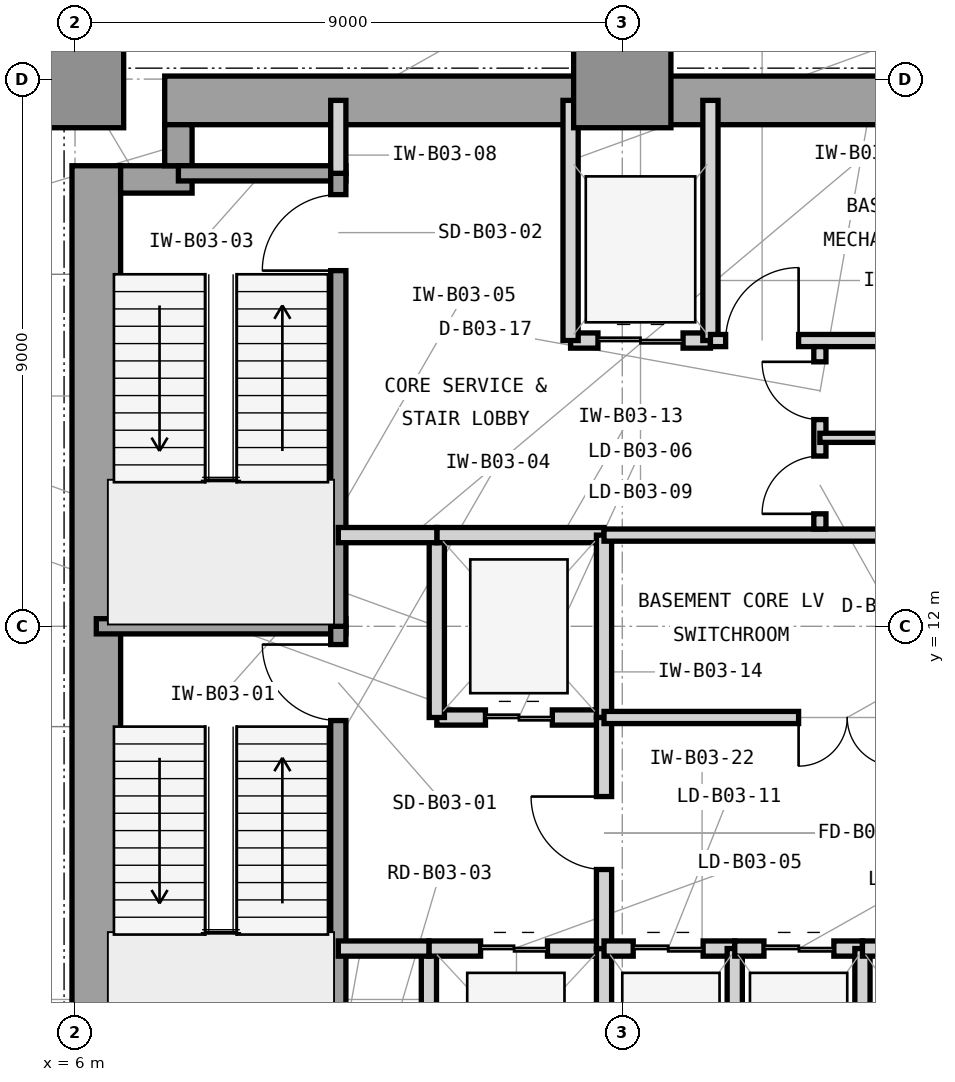
"""IFC4 building model, lengths in metres.
Left out: names, types, materials, properties, quantities, classifications, styles, units other than length and angle.
Written with IfcOpenShell. Run it as: python <this file> out.ifc"""

import sys

from ifc_helpers import new_model, si_unit, direction, frame, frame_2d, origin, origin_2d, place, context, subcontext, project, spatial, rectangle, extrude, element, fill, save


model = new_model("IFC4")
c1 = context("Model", 3, precision=1e-05, world=origin(), true_north=direction((0.0, 1.0)))
c2 = subcontext(c1, "Body", "Model", "MODEL_VIEW")
j1 = project(units=[si_unit("LENGTHUNIT", "METRE"), si_unit("PLANEANGLEUNIT", "RADIAN")], contexts=[c1])
p1 = place(None, origin())
s1 = spatial("IfcSite", under=j1, at=p1, CompositionType="ELEMENT")
p2 = place(p1, origin())
s2 = spatial("IfcBuilding", under=s1, at=p2, CompositionType="ELEMENT")
p3 = place(p2, frame((0.0, 0.0, -13.5)))
s3 = spatial("IfcBuildingStorey", under=s2, at=p3, CompositionType="ELEMENT", Elevation=-13.5)
p4 = place(p3, frame((6.35, 4.425, 0.0), z_axis=(0.0, 0.0, 1.0), x_axis=(0.0, 1.0, 0.0)))
e1 = element("IfcWall", 1, at=p4, inside=s3, PredefinedType="SHEAR", context=c2, shape_type="SweptSolid", body=[
    extrude(rectangle(XDim=15.15, YDim=0.8, at=frame_2d((7.575, 0.0))), origin(), (0.0, 0.0, 1.0), 4.5),
])
p5 = place(p3, frame((7.475, 20.65, 0.0), z_axis=(0.0, 0.0, 1.0), x_axis=(1.0, 0.0, 0.0)))
e2 = element("IfcWall", 2, at=p5, inside=s3, PredefinedType="SHEAR", context=c2, shape_type="SweptSolid", body=[
    extrude(rectangle(XDim=12.325, YDim=0.8, at=frame_2d((6.163, 0.0))), origin(), (0.0, 0.0, 1.0), 4.5),
])
p6 = place(p3, frame((6.75, 19.35, 0.0), z_axis=(0.0, 0.0, 1.0), x_axis=(1.0, 0.0, 0.0)))
e3 = element("IfcWall", 3, at=p6, inside=s3, PredefinedType="SHEAR", context=c2, shape_type="SweptSolid", body=[
    extrude(rectangle(XDim=1.175, YDim=0.45, at=frame_2d((0.587, 0.0))), origin(), (0.0, 0.0, 1.0), 4.5),
])
p7 = place(p3, frame((7.7, 19.575, 0.0), z_axis=(0.0, 0.0, 1.0), x_axis=(0.0, 1.0, 0.0)))
e4 = element("IfcWall", 4, at=p7, inside=s3, PredefinedType="SHEAR", context=c2, shape_type="SweptSolid", body=[
    extrude(rectangle(XDim=0.675, YDim=0.45, at=frame_2d((0.337, 0.0))), origin(), (0.0, 0.0, 1.0), 4.5),
])
for number, where, z_axis, x_axis in (
    (5, (6.0, 21.0, 0.0), (0.0, 0.0, 1.0), (1.0, 0.0, 0.0)),
    (6, (15.0, 21.0, 0.0), (0.0, 0.0, 1.0), (1.0, 0.0, 0.0)),
):
    element("IfcColumn", number, at=place(p3, frame(where, z_axis=z_axis, x_axis=x_axis)), inside=s3, PredefinedType="COLUMN", context=c2, shape_type="SweptSolid", body=[
        extrude(rectangle(XDim=1.6, YDim=1.6, at=origin_2d()), origin(), (0.0, 0.0, 1.0), 4.5),
    ])
p8 = place(p3, frame((6.35, 12.0, 0.0), z_axis=(0.0, 0.0, 1.0), x_axis=(1.0, 0.0, 0.0)))
e7 = element("IfcWall", 7, at=p8, inside=s3, PredefinedType="SHEAR", context=c2, shape_type="SweptSolid", body=[
    extrude(rectangle(XDim=4.105, YDim=0.25, at=frame_2d((2.052, 0.0))), origin(), (0.0, 0.0, 1.0), 4.5),
])
p9 = place(p3, frame((7.7, 19.45, 0.0), z_axis=(0.0, 0.0, 1.0), x_axis=(1.0, 0.0, 0.0)))
e8 = element("IfcWall", 8, at=p9, inside=s3, PredefinedType="SHEAR", context=c2, shape_type="SweptSolid", body=[
    extrude(rectangle(XDim=2.755, YDim=0.25, at=frame_2d((1.377, 0.0))), origin(), (0.0, 0.0, 1.0), 4.5),
])
p10 = place(p3, frame((10.33, 4.55, 0.0), z_axis=(0.0, 0.0, 1.0), x_axis=(0.0, 1.0, 0.0)))
e9 = element("IfcWall", 9, at=p10, inside=s3, PredefinedType="SHEAR", context=c2, shape_type="SweptSolid", body=[
    extrude(rectangle(XDim=7.45, YDim=0.25, at=frame_2d((3.725, 0.0))), origin(), (0.0, 0.0, 1.0), 4.5),
])
p11 = place(p10, frame((5.9, 0.0, 0.0)))
e10 = element("IfcOpeningElement", 10, at=p11, cuts=e9, PredefinedType="OPENING", context=c2, shape_type="SweptSolid", body=[
    extrude(rectangle(XDim=1.25, YDim=2.2, at=frame_2d((0.625, 1.1))), frame((0.0, 0.135, 0.0), z_axis=(0.0, -1.0, 0.0), x_axis=(1.0, 0.0, 0.0)), (0.0, 0.0, 1.0), 0.27),
])
p12 = place(p3, frame((10.33, 12.0, 0.0), z_axis=(0.0, 0.0, 1.0), x_axis=(0.0, 1.0, 0.0)))
e11 = element("IfcWall", 11, at=p12, inside=s3, PredefinedType="SHEAR", context=c2, shape_type="SweptSolid", body=[
    extrude(rectangle(XDim=7.45, YDim=0.25, at=frame_2d((3.725, 0.0))), origin(), (0.0, 0.0, 1.0), 4.5),
])
p13 = place(p12, frame((5.85, 0.0, 0.0)))
e12 = element("IfcOpeningElement", 12, at=p13, cuts=e11, PredefinedType="OPENING", context=c2, shape_type="SweptSolid", body=[
    extrude(rectangle(XDim=1.25, YDim=2.2, at=frame_2d((0.625, 1.1))), frame((0.0, 0.135, 0.0), z_axis=(0.0, -1.0, 0.0), x_axis=(1.0, 0.0, 0.0)), (0.0, 0.0, 1.0), 0.27),
])
p14 = place(p3, frame((11.82, 3.35, 0.0), z_axis=(0.0, 0.0, 1.0), x_axis=(0.0, 1.0, 0.0)))
e13 = element("IfcWall", 13, at=p14, inside=s3, PredefinedType="PARTITIONING", context=c2, shape_type="SweptSolid", body=[
    extrude(rectangle(XDim=3.35, YDim=0.25, at=frame_2d((1.675, 0.0))), origin(), (0.0, 0.0, 1.0), 4.14),
])
p15 = place(p3, frame((10.33, 19.45, 0.0), z_axis=(0.0, 0.0, 1.0), x_axis=(0.0, 1.0, 0.0)))
e14 = element("IfcWall", 14, at=p15, inside=s3, PredefinedType="PARTITIONING", context=c2, shape_type="SweptSolid", body=[
    extrude(rectangle(XDim=1.2, YDim=0.25, at=frame_2d((0.6, 0.0))), origin(), (0.0, 0.0, 1.0), 3.2),
])
p16 = place(p3, frame((11.82, 6.7, 0.0), z_axis=(0.0, 0.0, 1.0), x_axis=(1.0, 0.0, 0.0)))
e15 = element("IfcWall", 15, at=p16, inside=s3, PredefinedType="PARTITIONING", context=c2, shape_type="SweptSolid", body=[
    extrude(rectangle(XDim=2.88, YDim=0.25, at=frame_2d((1.44, 0.0))), origin(), (0.0, 0.0, 1.0), 3.523),
])
p17 = place(p16, frame((0.85, 0.0, 0.0)))
e16 = element("IfcOpeningElement", 16, at=p17, cuts=e15, PredefinedType="OPENING", context=c2, shape_type="SweptSolid", body=[
    extrude(rectangle(XDim=1.1, YDim=2.25, at=frame_2d((0.55, 1.125))), frame((0.0, 0.135, 0.0), z_axis=(0.0, -1.0, 0.0), x_axis=(1.0, 0.0, 0.0)), (0.0, 0.0, 1.0), 0.27),
])
p18 = place(p3, frame((14.7, 3.35, 0.0), z_axis=(0.0, 0.0, 1.0), x_axis=(0.0, 1.0, 0.0)))
e17 = element("IfcWall", 17, at=p18, inside=s3, PredefinedType="PARTITIONING", context=c2, shape_type="SweptSolid", body=[
    extrude(rectangle(XDim=3.35, YDim=0.25, at=frame_2d((1.675, 0.0))), origin(), (0.0, 0.0, 1.0), 4.14),
])
p19 = place(p3, frame((11.95, 10.5, 0.0), z_axis=(0.0, 0.0, 1.0), x_axis=(1.0, 0.0, 0.0)))
e18 = element("IfcWall", 18, at=p19, inside=s3, PredefinedType="PARTITIONING", context=c2, shape_type="SweptSolid", body=[
    extrude(rectangle(XDim=2.75, YDim=0.25, at=frame_2d((1.375, 0.0))), origin(), (0.0, 0.0, 1.0), 3.523),
])
p20 = place(p19, frame((0.8, 0.0, 0.0)))
e19 = element("IfcOpeningElement", 19, at=p20, cuts=e18, PredefinedType="OPENING", context=c2, shape_type="SweptSolid", body=[
    extrude(rectangle(XDim=1.1, YDim=2.25, at=frame_2d((0.55, 1.125))), frame((0.0, 0.135, 0.0), z_axis=(0.0, -1.0, 0.0), x_axis=(1.0, 0.0, 0.0)), (0.0, 0.0, 1.0), 0.27),
])
p21 = place(p3, frame((11.95, 10.5, 0.0), z_axis=(0.0, 0.0, 1.0), x_axis=(0.0, 1.0, 0.0)))
e20 = element("IfcWall", 20, at=p21, inside=s3, PredefinedType="PARTITIONING", context=c2, shape_type="SweptSolid", body=[
    extrude(rectangle(XDim=3.0, YDim=0.25, at=frame_2d((1.5, 0.0))), origin(), (0.0, 0.0, 1.0), 4.14),
])
p22 = place(p3, frame((11.95, 13.5, 0.0), z_axis=(0.0, 0.0, 1.0), x_axis=(1.0, 0.0, 0.0)))
e21 = element("IfcWall", 21, at=p22, inside=s3, PredefinedType="PARTITIONING", context=c2, shape_type="SweptSolid", body=[
    extrude(rectangle(XDim=2.75, YDim=0.25, at=frame_2d((1.375, 0.0))), origin(), (0.0, 0.0, 1.0), 3.523),
])
p23 = place(p3, frame((14.7, 10.5, 0.0), z_axis=(0.0, 0.0, 1.0), x_axis=(0.0, 1.0, 0.0)))
e22 = element("IfcWall", 22, at=p23, inside=s3, PredefinedType="PARTITIONING", context=c2, shape_type="SweptSolid", body=[
    extrude(rectangle(XDim=3.0, YDim=0.25, at=frame_2d((1.5, 0.0))), origin(), (0.0, 0.0, 1.0), 4.14),
])
p24 = place(p3, frame((14.7, 6.7, 0.0), z_axis=(0.0, 0.0, 1.0), x_axis=(0.0, 1.0, 0.0)))
e23 = element("IfcWall", 23, at=p24, inside=s3, PredefinedType="PARTITIONING", context=c2, shape_type="SweptSolid", body=[
    extrude(rectangle(XDim=3.8, YDim=0.25, at=frame_2d((1.9, 0.0))), origin(), (0.0, 0.0, 1.0), 4.14),
])
p25 = place(p24, frame((1.3, 0.0, 0.0)))
e24 = element("IfcOpeningElement", 24, at=p25, cuts=e23, PredefinedType="OPENING", context=c2, shape_type="SweptSolid", body=[
    extrude(rectangle(XDim=1.2, YDim=2.2, at=frame_2d((0.6, 1.1))), frame((0.0, 0.135, 0.0), z_axis=(0.0, -1.0, 0.0), x_axis=(1.0, 0.0, 0.0)), (0.0, 0.0, 1.0), 0.27),
])
p26 = place(p3, frame((10.33, 13.5, 0.0), z_axis=(0.0, 0.0, 1.0), x_axis=(1.0, 0.0, 0.0)))
e25 = element("IfcWall", 25, at=p26, inside=s3, PredefinedType="PARTITIONING", context=c2, shape_type="SweptSolid", body=[
    extrude(rectangle(XDim=1.62, YDim=0.25, at=frame_2d((0.81, 0.0))), origin(), (0.0, 0.0, 1.0), 3.523),
])
p27 = place(p3, frame((10.33, 6.7, 0.0), z_axis=(0.0, 0.0, 1.0), x_axis=(1.0, 0.0, 0.0)))
e26 = element("IfcWall", 26, at=p27, inside=s3, PredefinedType="PARTITIONING", context=c2, shape_type="SweptSolid", body=[
    extrude(rectangle(XDim=1.49, YDim=0.25, at=frame_2d((0.745, 0.0))), origin(), (0.0, 0.0, 1.0), 3.523),
])
p28 = place(p3, frame((14.15, 16.7, 0.0), z_axis=(0.0, 0.0, 1.0), x_axis=(1.0, 0.0, 0.0)))
e27 = element("IfcWall", 27, at=p28, inside=s3, PredefinedType="PARTITIONING", context=c2, shape_type="SweptSolid", body=[
    extrude(rectangle(XDim=2.3, YDim=0.25, at=frame_2d((1.15, 0.0))), origin(), (0.0, 0.0, 1.0), 3.523),
])
p29 = place(p28, frame((0.45, 0.0, 0.0)))
e28 = element("IfcOpeningElement", 28, at=p29, cuts=e27, PredefinedType="OPENING", context=c2, shape_type="SweptSolid", body=[
    extrude(rectangle(XDim=1.4, YDim=2.35, at=frame_2d((0.7, 1.175))), frame((0.0, 0.135, 0.0), z_axis=(0.0, -1.0, 0.0), x_axis=(1.0, 0.0, 0.0)), (0.0, 0.0, 1.0), 0.27),
])
for number, where, z_axis, x_axis in (
    (29, (14.15, 16.7, 0.0), (0.0, 0.0, 1.0), (0.0, 1.0, 0.0)),
    (30, (16.45, 16.7, 0.0), (0.0, 0.0, 1.0), (0.0, 1.0, 0.0)),
):
    element("IfcWall", number, at=place(p3, frame(where, z_axis=z_axis, x_axis=x_axis)), inside=s3, PredefinedType="PARTITIONING", context=c2, shape_type="SweptSolid", body=[
        extrude(rectangle(XDim=3.95, YDim=0.25, at=frame_2d((1.975, 0.0))), origin(), (0.0, 0.0, 1.0), 4.14),
    ])
p30 = place(p3, frame((16.45, 16.7, 0.0), z_axis=(0.0, 0.0, 1.0), x_axis=(1.0, 0.0, 0.0)))
e31 = element("IfcWall", 31, at=p30, inside=s3, PredefinedType="PARTITIONING", context=c2, shape_type="SweptSolid", body=[
    extrude(rectangle(XDim=7.2, YDim=0.2, at=frame_2d((3.6, 0.0))), origin(), (0.0, 0.0, 1.0), 3.523),
])
p31 = place(p30, frame((0.25, 0.0, 0.0)))
e32 = element("IfcOpeningElement", 32, at=p31, cuts=e31, PredefinedType="OPENING", context=c2, shape_type="SweptSolid", body=[
    extrude(rectangle(XDim=1.2, YDim=2.2, at=frame_2d((0.6, 1.1))), frame((0.0, 0.11, 0.0), z_axis=(0.0, -1.0, 0.0), x_axis=(1.0, 0.0, 0.0)), (0.0, 0.0, 1.0), 0.22),
])
p32 = place(p3, frame((14.7, 6.7, 0.0), z_axis=(0.0, 0.0, 1.0), x_axis=(1.0, 0.0, 0.0)))
e33 = element("IfcWall", 33, at=p32, inside=s3, PredefinedType="PARTITIONING", context=c2, shape_type="SweptSolid", body=[
    extrude(rectangle(XDim=2.15, YDim=0.25, at=frame_2d((1.075, 0.0))), origin(), (0.0, 0.0, 1.0), 3.523),
])
p33 = place(p32, frame((0.48, 0.0, 0.0)))
e34 = element("IfcOpeningElement", 34, at=p33, cuts=e33, PredefinedType="OPENING", context=c2, shape_type="SweptSolid", body=[
    extrude(rectangle(XDim=1.15, YDim=2.25, at=frame_2d((0.575, 1.125))), frame((0.0, 0.135, 0.0), z_axis=(0.0, -1.0, 0.0), x_axis=(1.0, 0.0, 0.0)), (0.0, 0.0, 1.0), 0.27),
])
p34 = place(p3, frame((16.85, 3.35, 0.0), z_axis=(0.0, 0.0, 1.0), x_axis=(0.0, 1.0, 0.0)))
e35 = element("IfcWall", 35, at=p34, inside=s3, PredefinedType="PARTITIONING", context=c2, shape_type="SweptSolid", body=[
    extrude(rectangle(XDim=3.35, YDim=0.25, at=frame_2d((1.675, 0.0))), origin(), (0.0, 0.0, 1.0), 4.14),
])
p35 = place(p3, frame((16.85, 6.7, 0.0), z_axis=(0.0, 0.0, 1.0), x_axis=(1.0, 0.0, 0.0)))
e36 = element("IfcWall", 36, at=p35, inside=s3, PredefinedType="PARTITIONING", context=c2, shape_type="SweptSolid", body=[
    extrude(rectangle(XDim=2.1, YDim=0.25, at=frame_2d((1.05, 0.0))), origin(), (0.0, 0.0, 1.0), 3.523),
])
p36 = place(p35, frame((0.48, 0.0, 0.0)))
e37 = element("IfcOpeningElement", 37, at=p36, cuts=e36, PredefinedType="OPENING", context=c2, shape_type="SweptSolid", body=[
    extrude(rectangle(XDim=1.15, YDim=2.25, at=frame_2d((0.575, 1.125))), frame((0.0, 0.135, 0.0), z_axis=(0.0, -1.0, 0.0), x_axis=(1.0, 0.0, 0.0)), (0.0, 0.0, 1.0), 0.27),
])
p37 = place(p3, frame((18.95, 3.35, 0.0), z_axis=(0.0, 0.0, 1.0), x_axis=(0.0, 1.0, 0.0)))
e38 = element("IfcWall", 38, at=p37, inside=s3, PredefinedType="PARTITIONING", context=c2, shape_type="SweptSolid", body=[
    extrude(rectangle(XDim=3.35, YDim=0.25, at=frame_2d((1.675, 0.0))), origin(), (0.0, 0.0, 1.0), 4.14),
])
p38 = place(p3, frame((18.95, 6.7, 0.0), z_axis=(0.0, 0.0, 1.0), x_axis=(1.0, 0.0, 0.0)))
e39 = element("IfcWall", 39, at=p38, inside=s3, PredefinedType="PARTITIONING", context=c2, shape_type="SweptSolid", body=[
    extrude(rectangle(XDim=2.1, YDim=0.25, at=frame_2d((1.05, 0.0))), origin(), (0.0, 0.0, 1.0), 3.523),
])
p39 = place(p38, frame((0.48, 0.0, 0.0)))
e40 = element("IfcOpeningElement", 40, at=p39, cuts=e39, PredefinedType="OPENING", context=c2, shape_type="SweptSolid", body=[
    extrude(rectangle(XDim=1.15, YDim=2.25, at=frame_2d((0.575, 1.125))), frame((0.0, 0.135, 0.0), z_axis=(0.0, -1.0, 0.0), x_axis=(1.0, 0.0, 0.0)), (0.0, 0.0, 1.0), 0.27),
])
p40 = place(p3, frame((14.7, 10.5, 0.0), z_axis=(0.0, 0.0, 1.0), x_axis=(1.0, 0.0, 0.0)))
e41 = element("IfcWall", 41, at=p40, inside=s3, PredefinedType="PARTITIONING", context=c2, shape_type="SweptSolid", body=[
    extrude(rectangle(XDim=8.95, YDim=0.2, at=frame_2d((4.475, 0.0))), origin(), (0.0, 0.0, 1.0), 3.523),
])
p41 = place(p40, frame((3.2, 0.0, 0.0)))
e42 = element("IfcOpeningElement", 42, at=p41, cuts=e41, PredefinedType="OPENING", context=c2, shape_type="SweptSolid", body=[
    extrude(rectangle(XDim=1.6, YDim=2.3, at=frame_2d((0.8, 1.15))), frame((0.0, 0.11, 0.0), z_axis=(0.0, -1.0, 0.0), x_axis=(1.0, 0.0, 0.0)), (0.0, 0.0, 1.0), 0.22),
])
p42 = place(p3, frame((14.7, 13.5, 0.0), z_axis=(0.0, 0.0, 1.0), x_axis=(1.0, 0.0, 0.0)))
e43 = element("IfcWall", 43, at=p42, inside=s3, PredefinedType="PARTITIONING", context=c2, shape_type="SweptSolid", body=[
    extrude(rectangle(XDim=8.95, YDim=0.2, at=frame_2d((4.475, 0.0))), origin(), (0.0, 0.0, 1.0), 3.523),
])
p43 = place(p3, frame((18.25, 13.6, 0.0), z_axis=(0.0, 0.0, 1.0), x_axis=(0.0, 1.0, 0.0)))
e44 = element("IfcWall", 44, at=p43, inside=s3, PredefinedType="PARTITIONING", context=c2, shape_type="SweptSolid", body=[
    extrude(rectangle(XDim=3.0, YDim=0.2, at=frame_2d((1.5, 0.0))), origin(), (0.0, 0.0, 1.0), 4.14),
])
p44 = place(p43, frame((0.25, 0.0, 0.0)))
e45 = element("IfcOpeningElement", 45, at=p44, cuts=e44, PredefinedType="OPENING", context=c2, shape_type="SweptSolid", body=[
    extrude(rectangle(XDim=0.95, YDim=2.1, at=frame_2d((0.475, 1.05))), frame((0.0, 0.11, 0.0), z_axis=(0.0, -1.0, 0.0), x_axis=(1.0, 0.0, 0.0)), (0.0, 0.0, 1.0), 0.22),
])
p45 = place(p43, frame((1.8, 0.0, 0.0)))
e46 = element("IfcOpeningElement", 46, at=p45, cuts=e44, PredefinedType="OPENING", context=c2, shape_type="SweptSolid", body=[
    extrude(rectangle(XDim=0.95, YDim=2.1, at=frame_2d((0.475, 1.05))), frame((0.0, 0.11, 0.0), z_axis=(0.0, -1.0, 0.0), x_axis=(1.0, 0.0, 0.0)), (0.0, 0.0, 1.0), 0.22),
])
p46 = place(p3, frame((18.25, 15.1, 0.0), z_axis=(0.0, 0.0, 1.0), x_axis=(1.0, 0.0, 0.0)))
e47 = element("IfcWall", 47, at=p46, inside=s3, PredefinedType="PARTITIONING", context=c2, shape_type="SweptSolid", body=[
    extrude(rectangle(XDim=5.4, YDim=0.15, at=frame_2d((2.7, 0.0))), origin(), (0.0, 0.0, 1.0), 4.14),
])
p47 = place(p11, origin())
e48 = element("IfcDoor", 48, at=p47, inside=s3, OperationType="SINGLE_SWING_RIGHT", PredefinedType="DOOR", context=c2, shape_type="SweptSolid", body=[
    extrude(rectangle(XDim=1.25, YDim=2.2, at=frame_2d((0.625, 1.1))), frame((0.0, 0.025, 0.0), z_axis=(0.0, -1.0, 0.0), x_axis=(1.0, 0.0, 0.0)), (0.0, 0.0, 1.0), 0.05),
])
fill(e10, e48)
p48 = place(p13, origin())
e49 = element("IfcDoor", 49, at=p48, inside=s3, OperationType="SINGLE_SWING_LEFT", PredefinedType="DOOR", context=c2, shape_type="SweptSolid", body=[
    extrude(rectangle(XDim=1.25, YDim=2.2, at=frame_2d((0.625, 1.1))), frame((0.0, 0.025, 0.0), z_axis=(0.0, -1.0, 0.0), x_axis=(1.0, 0.0, 0.0)), (0.0, 0.0, 1.0), 0.05),
])
fill(e12, e49)
p49 = place(p17, origin())
e50 = element("IfcDoor", 50, at=p49, inside=s3, OperationType="DOUBLE_DOOR_SLIDING", PredefinedType="DOOR", context=c2, shape_type="SweptSolid", body=[
    extrude(rectangle(XDim=1.1, YDim=2.25, at=frame_2d((0.55, 1.125))), frame((0.0, 0.025, 0.0), z_axis=(0.0, -1.0, 0.0), x_axis=(1.0, 0.0, 0.0)), (0.0, 0.0, 1.0), 0.05),
])
fill(e16, e50)
p50 = place(p20, origin())
e51 = element("IfcDoor", 51, at=p50, inside=s3, OperationType="DOUBLE_DOOR_SLIDING", PredefinedType="DOOR", context=c2, shape_type="SweptSolid", body=[
    extrude(rectangle(XDim=1.1, YDim=2.25, at=frame_2d((0.55, 1.125))), frame((0.0, 0.025, 0.0), z_axis=(0.0, -1.0, 0.0), x_axis=(1.0, 0.0, 0.0)), (0.0, 0.0, 1.0), 0.05),
])
fill(e19, e51)
p51 = place(p25, origin())
e52 = element("IfcDoor", 52, at=p51, inside=s3, OperationType="SINGLE_SWING_RIGHT", PredefinedType="DOOR", context=c2, shape_type="SweptSolid", body=[
    extrude(rectangle(XDim=1.2, YDim=2.2, at=frame_2d((0.6, 1.1))), frame((0.0, 0.025, 0.0), z_axis=(0.0, -1.0, 0.0), x_axis=(1.0, 0.0, 0.0)), (0.0, 0.0, 1.0), 0.05),
])
fill(e24, e52)
p52 = place(p29, origin())
e53 = element("IfcDoor", 53, at=p52, inside=s3, OperationType="DOUBLE_DOOR_SLIDING", PredefinedType="DOOR", context=c2, shape_type="SweptSolid", body=[
    extrude(rectangle(XDim=1.4, YDim=2.35, at=frame_2d((0.7, 1.175))), frame((0.0, 0.025, 0.0), z_axis=(0.0, -1.0, 0.0), x_axis=(1.0, 0.0, 0.0)), (0.0, 0.0, 1.0), 0.05),
])
fill(e28, e53)
p53 = place(p31, origin())
e54 = element("IfcDoor", 54, at=p53, inside=s3, OperationType="SINGLE_SWING_RIGHT", PredefinedType="DOOR", context=c2, shape_type="SweptSolid", body=[
    extrude(rectangle(XDim=1.2, YDim=2.2, at=frame_2d((0.6, 1.1))), frame((0.0, 0.025, 0.0), z_axis=(0.0, -1.0, 0.0), x_axis=(1.0, 0.0, 0.0)), (0.0, 0.0, 1.0), 0.05),
])
fill(e32, e54)
p54 = place(p33, origin())
e55 = element("IfcDoor", 55, at=p54, inside=s3, OperationType="DOUBLE_DOOR_SLIDING", PredefinedType="DOOR", context=c2, shape_type="SweptSolid", body=[
    extrude(rectangle(XDim=1.15, YDim=2.25, at=frame_2d((0.575, 1.125))), frame((0.0, 0.025, 0.0), z_axis=(0.0, -1.0, 0.0), x_axis=(1.0, 0.0, 0.0)), (0.0, 0.0, 1.0), 0.05),
])
fill(e34, e55)
p55 = place(p36, origin())
e56 = element("IfcDoor", 56, at=p55, inside=s3, OperationType="DOUBLE_DOOR_SLIDING", PredefinedType="DOOR", context=c2, shape_type="SweptSolid", body=[
    extrude(rectangle(XDim=1.15, YDim=2.25, at=frame_2d((0.575, 1.125))), frame((0.0, 0.025, 0.0), z_axis=(0.0, -1.0, 0.0), x_axis=(1.0, 0.0, 0.0)), (0.0, 0.0, 1.0), 0.05),
])
fill(e37, e56)
p56 = place(p41, frame((1.6, 0.0, 0.0), z_axis=(0.0, 0.0, 1.0), x_axis=(-1.0, 0.0, 0.0)))
e57 = element("IfcDoor", 57, at=p56, inside=s3, OperationType="DOUBLE_DOOR_SINGLE_SWING", PredefinedType="DOOR", context=c2, shape_type="SweptSolid", body=[
    extrude(rectangle(XDim=1.6, YDim=2.3, at=frame_2d((0.8, 1.15))), frame((0.0, 0.025, 0.0), z_axis=(0.0, -1.0, 0.0), x_axis=(1.0, 0.0, 0.0)), (0.0, 0.0, 1.0), 0.05),
])
fill(e42, e57)
p57 = place(p44, origin())
e58 = element("IfcDoor", 58, at=p57, inside=s3, OperationType="SINGLE_SWING_LEFT", PredefinedType="DOOR", context=c2, shape_type="SweptSolid", body=[
    extrude(rectangle(XDim=0.95, YDim=2.1, at=frame_2d((0.475, 1.05))), frame((0.0, 0.025, 0.0), z_axis=(0.0, -1.0, 0.0), x_axis=(1.0, 0.0, 0.0)), (0.0, 0.0, 1.0), 0.05),
])
fill(e45, e58)
p58 = place(p45, origin())
e59 = element("IfcDoor", 59, at=p58, inside=s3, OperationType="SINGLE_SWING_RIGHT", PredefinedType="DOOR", context=c2, shape_type="SweptSolid", body=[
    extrude(rectangle(XDim=0.95, YDim=2.1, at=frame_2d((0.475, 1.05))), frame((0.0, 0.025, 0.0), z_axis=(0.0, -1.0, 0.0), x_axis=(1.0, 0.0, 0.0)), (0.0, 0.0, 1.0), 0.05),
])
fill(e46, e59)
save(model, sys.argv[1])
